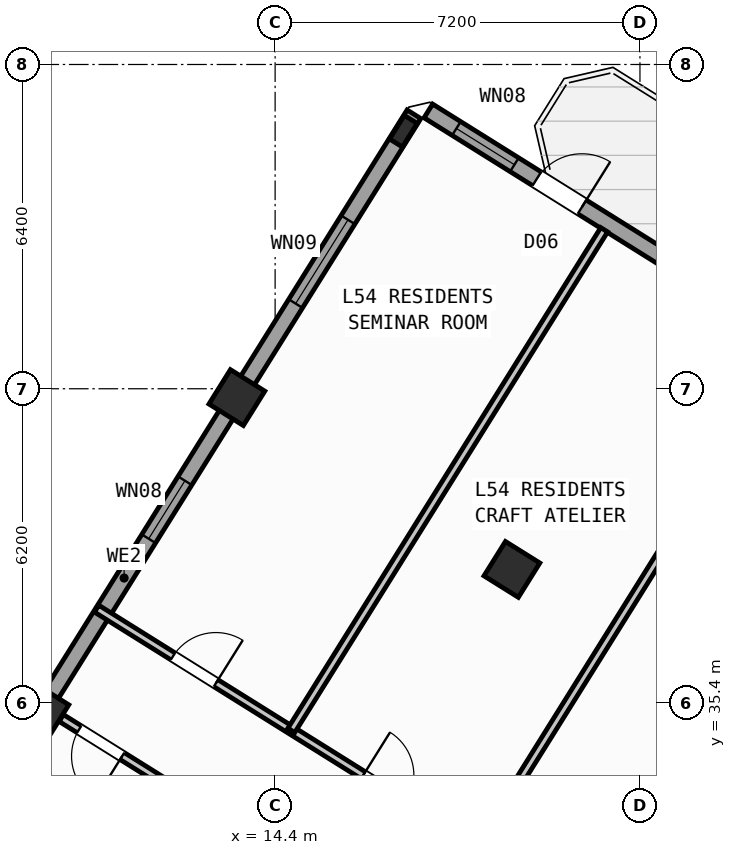
"""IFC4 building model, lengths in metres.
Left out: names, types, materials, properties, quantities, classifications, styles, units other than length and angle.
Written with IfcOpenShell. Run it as: python <this file> out.ifc"""

import sys

from ifc_helpers import new_model, si_unit, direction, frame, frame_2d, origin, origin_2d, place, context, subcontext, project, spatial, rectangle, hollow_rectangle, i_section, extrude, source, transform, mapped, element, fill, save


model = new_model("IFC4")
c1 = context("Model", 3, precision=1e-05, world=origin(), true_north=direction((0.0, 1.0)))
c2 = subcontext(c1, "Body", "Model", "MODEL_VIEW")
j1 = project(units=[si_unit("LENGTHUNIT", "METRE"), si_unit("PLANEANGLEUNIT", "RADIAN")], contexts=[c1])
p1 = place(None, origin())
s1 = spatial("IfcSite", under=j1, at=p1, CompositionType="ELEMENT")
p2 = place(p1, origin())
s2 = spatial("IfcBuilding", under=s1, at=p2, CompositionType="ELEMENT")
p3 = place(p2, frame((0.0, 0.0, 214.8)))
s3 = spatial("IfcBuildingStorey", under=s2, at=p3, CompositionType="ELEMENT", Elevation=214.8)
m1 = source(origin(), c2, "Body", "SweptSolid", [
    extrude(hollow_rectangle(XDim=0.8, YDim=0.8, WallThickness=0.032, at=origin_2d()), origin(), (0.0, 0.0, 1.0), 3.6),
])
p4 = place(p3, frame((19.073, 38.034, 0.0), z_axis=(0.0, 0.0, 1.0), x_axis=(-0.848048096156, 0.529919264233, 0.0)))
e1 = element("IfcColumn", 1, at=p4, inside=s3, PredefinedType="COLUMN", context=c2, shape_type="MappedRepresentation", body=[
    mapped(m1, transform((0.0, 0.0, 0.0), scale=1.0)),
])
m2 = source(origin(), c2, "Body", "SweptSolid", [
    extrude(i_section(OverallWidth=0.3, OverallDepth=0.55, WebThickness=0.015, FlangeThickness=0.029, at=origin_2d()), origin(), (0.0, 0.0, 1.0), 3.6),
])
p5 = place(p3, frame((16.931, 46.684, 0.0), z_axis=(0.0, 0.0, 1.0), x_axis=(-0.848048096156, 0.529919264233, 0.0)))
e2 = element("IfcColumn", 2, at=p5, inside=s3, PredefinedType="COLUMN", context=c2, shape_type="MappedRepresentation", body=[
    mapped(m2, transform((0.0, 0.0, 0.0), scale=1.0)),
])
for number, where, z_axis, x_axis in (
    (3, (13.646, 41.426, 0.0), (0.0, 0.0, 1.0), (-0.848, 0.53, 0.0)),
    (4, (9.777, 35.235, 0.0), (0.0, 0.0, 1.0), (-0.848, 0.53, 0.0)),
):
    element("IfcColumn", number, at=place(p3, frame(where, z_axis=z_axis, x_axis=x_axis)), inside=s3, PredefinedType="COLUMN", context=c2, shape_type="MappedRepresentation", body=[
        mapped(m1, transform((0.0, 0.0, 0.0), scale=1.0)),
    ])
p6 = place(p3, frame((5.7, 28.71, 0.0), z_axis=(0.0, 0.0, 1.0), x_axis=(0.529923711467, 0.8480453172, 0.0)))
e5 = element("IfcWall", 5, at=p6, inside=s3, PredefinedType="STANDARD", context=c2, shape_type="SweptSolid", body=[
    extrude(rectangle(XDim=21.587, YDim=0.32, at=frame_2d((10.794, 0.0))), origin(), (0.0, 0.0, 1.0), 2.825),
])
p7 = place(p6, frame((2.184, 0.0, 0.9)))
e6 = element("IfcOpeningElement", 6, at=p7, cuts=e5, PredefinedType="OPENING", context=c2, shape_type="SweptSolid", body=[
    extrude(rectangle(XDim=1.65, YDim=1.45, at=frame_2d((0.825, 0.725))), frame((0.0, 0.17, 0.0), z_axis=(0.0, -1.0, 0.0), x_axis=(1.0, 0.0, 0.0)), (0.0, 0.0, 1.0), 0.34),
])
p8 = place(p6, frame((11.709, 0.0, 0.9)))
e7 = element("IfcOpeningElement", 7, at=p8, cuts=e5, PredefinedType="OPENING", context=c2, shape_type="SweptSolid", body=[
    extrude(rectangle(XDim=1.35, YDim=1.45, at=frame_2d((0.675, 0.725))), frame((0.0, 0.17, 0.0), z_axis=(0.0, -1.0, 0.0), x_axis=(1.0, 0.0, 0.0)), (0.0, 0.0, 1.0), 0.34),
])
p9 = place(p6, frame((17.181, 0.0, 0.95)))
e8 = element("IfcOpeningElement", 8, at=p9, cuts=e5, PredefinedType="OPENING", context=c2, shape_type="SweptSolid", body=[
    extrude(rectangle(XDim=1.95, YDim=1.35, at=frame_2d((0.975, 0.675))), frame((0.0, 0.17, 0.0), z_axis=(0.0, -1.0, 0.0), x_axis=(1.0, 0.0, 0.0)), (0.0, 0.0, 1.0), 0.34),
])
p10 = place(p3, frame((17.424, 47.083, 0.0), z_axis=(0.0, 0.0, 1.0), x_axis=(0.848049927979, -0.529916332693, 0.0)))
e9 = element("IfcWall", 9, at=p10, inside=s3, PredefinedType="STANDARD", context=c2, shape_type="SweptSolid", body=[
    extrude(rectangle(XDim=29.223, YDim=0.32, at=frame_2d((14.612, 0.0))), origin(), (0.0, 0.0, 1.0), 3.35),
])
p11 = place(p10, frame((2.526, 0.0, 0.0)))
e10 = element("IfcOpeningElement", 10, at=p11, cuts=e9, PredefinedType="OPENING", context=c2, shape_type="SweptSolid", body=[
    extrude(rectangle(XDim=1.05, YDim=2.15, at=frame_2d((0.525, 1.075))), frame((0.0, 0.17, 0.0), z_axis=(0.0, -1.0, 0.0), x_axis=(1.0, 0.0, 0.0)), (0.0, 0.0, 1.0), 0.34),
])
p12 = place(p10, frame((0.653, 0.0, 0.9)))
e11 = element("IfcOpeningElement", 11, at=p12, cuts=e9, PredefinedType="OPENING", context=c2, shape_type="SweptSolid", body=[
    extrude(rectangle(XDim=1.35, YDim=1.45, at=frame_2d((0.675, 0.725))), frame((0.0, 0.17, 0.0), z_axis=(0.0, -1.0, 0.0), x_axis=(1.0, 0.0, 0.0)), (0.0, 0.0, 1.0), 0.34),
])
p13 = place(p10, frame((6.897, 0.0, 1.0)))
e12 = element("IfcOpeningElement", 12, at=p13, cuts=e9, PredefinedType="OPENING", context=c2, shape_type="SweptSolid", body=[
    extrude(rectangle(XDim=0.9, YDim=1.25, at=frame_2d((0.45, 0.625))), frame((0.0, 0.17, 0.0), z_axis=(0.0, -1.0, 0.0), x_axis=(1.0, 0.0, 0.0)), (0.0, 0.0, 1.0), 0.34),
])
p14 = place(p10, frame((9.602, 0.0, 0.95)))
e13 = element("IfcOpeningElement", 13, at=p14, cuts=e9, PredefinedType="OPENING", context=c2, shape_type="SweptSolid", body=[
    extrude(rectangle(XDim=1.95, YDim=1.35, at=frame_2d((0.975, 0.675))), frame((0.0, 0.17, 0.0), z_axis=(0.0, -1.0, 0.0), x_axis=(1.0, 0.0, 0.0)), (0.0, 0.0, 1.0), 0.34),
])
p15 = place(p10, frame((14.096, 0.0, 1.0)))
e14 = element("IfcOpeningElement", 14, at=p15, cuts=e9, PredefinedType="OPENING", context=c2, shape_type="SweptSolid", body=[
    extrude(rectangle(XDim=0.9, YDim=1.25, at=frame_2d((0.45, 0.625))), frame((0.0, 0.17, 0.0), z_axis=(0.0, -1.0, 0.0), x_axis=(1.0, 0.0, 0.0)), (0.0, 0.0, 1.0), 0.34),
])
p16 = place(p10, frame((17.254, 0.0, 1.0)))
e15 = element("IfcOpeningElement", 15, at=p16, cuts=e9, PredefinedType="OPENING", context=c2, shape_type="SweptSolid", body=[
    extrude(rectangle(XDim=0.9, YDim=1.25, at=frame_2d((0.45, 0.625))), frame((0.0, 0.17, 0.0), z_axis=(0.0, -1.0, 0.0), x_axis=(1.0, 0.0, 0.0)), (0.0, 0.0, 1.0), 0.34),
])
p17 = place(p10, frame((21.139, 0.0, 0.9)))
e16 = element("IfcOpeningElement", 16, at=p17, cuts=e9, PredefinedType="OPENING", context=c2, shape_type="SweptSolid", body=[
    extrude(rectangle(XDim=1.35, YDim=1.45, at=frame_2d((0.675, 0.725))), frame((0.0, 0.17, 0.0), z_axis=(0.0, -1.0, 0.0), x_axis=(1.0, 0.0, 0.0)), (0.0, 0.0, 1.0), 0.34),
])
p18 = place(p10, frame((25.778, 0.0, 0.9)))
e17 = element("IfcOpeningElement", 17, at=p18, cuts=e9, PredefinedType="OPENING", context=c2, shape_type="SweptSolid", body=[
    extrude(rectangle(XDim=1.35, YDim=1.45, at=frame_2d((0.675, 0.725))), frame((0.0, 0.17, 0.0), z_axis=(0.0, -1.0, 0.0), x_axis=(1.0, 0.0, 0.0)), (0.0, 0.0, 1.0), 0.34),
])
p19 = place(p3, frame((25.065, 28.394, 0.0), z_axis=(0.0, 0.0, 1.0), x_axis=(-0.848048310262, 0.529918921593, 0.0)))
e18 = element("IfcWall", 18, at=p19, inside=s3, PredefinedType="PARTITIONING", context=c2, shape_type="SweptSolid", body=[
    extrude(rectangle(XDim=16.73, YDim=0.16, at=frame_2d((8.365, 0.0))), origin(), (0.0, 0.0, 1.0), 3.34),
])
p20 = place(p19, frame((1.338, 0.0, 0.0)))
e19 = element("IfcOpeningElement", 19, at=p20, cuts=e18, PredefinedType="OPENING", context=c2, shape_type="SweptSolid", body=[
    extrude(rectangle(XDim=1.0, YDim=2.1, at=frame_2d((0.5, 1.05))), frame((0.0, 0.09, 0.0), z_axis=(0.0, -1.0, 0.0), x_axis=(1.0, 0.0, 0.0)), (0.0, 0.0, 1.0), 0.18),
])
p21 = place(p19, frame((5.265, 0.0, 0.0)))
e20 = element("IfcOpeningElement", 20, at=p21, cuts=e18, PredefinedType="OPENING", context=c2, shape_type="SweptSolid", body=[
    extrude(rectangle(XDim=1.0, YDim=2.1, at=frame_2d((0.5, 1.05))), frame((0.0, 0.09, 0.0), z_axis=(0.0, -1.0, 0.0), x_axis=(1.0, 0.0, 0.0)), (0.0, 0.0, 1.0), 0.18),
])
p22 = place(p19, frame((9.526, 0.0, 0.0)))
e21 = element("IfcOpeningElement", 21, at=p22, cuts=e18, PredefinedType="OPENING", context=c2, shape_type="SweptSolid", body=[
    extrude(rectangle(XDim=1.0, YDim=2.1, at=frame_2d((0.5, 1.05))), frame((0.0, 0.09, 0.0), z_axis=(0.0, -1.0, 0.0), x_axis=(1.0, 0.0, 0.0)), (0.0, 0.0, 1.0), 0.18),
])
p23 = place(p19, frame((13.954, 0.0, 0.0)))
e22 = element("IfcOpeningElement", 22, at=p23, cuts=e18, PredefinedType="OPENING", context=c2, shape_type="SweptSolid", body=[
    extrude(rectangle(XDim=1.0, YDim=2.1, at=frame_2d((0.5, 1.05))), frame((0.0, 0.09, 0.0), z_axis=(0.0, -1.0, 0.0), x_axis=(1.0, 0.0, 0.0)), (0.0, 0.0, 1.0), 0.18),
])
p24 = place(p3, frame((14.908, 32.147, 0.0), z_axis=(0.0, 0.0, 1.0), x_axis=(-0.848049955116, 0.529916289265, 0.0)))
e23 = element("IfcWall", 23, at=p24, inside=s3, PredefinedType="PARTITIONING", context=c2, shape_type="SweptSolid", body=[
    extrude(rectangle(XDim=5.576, YDim=0.16, at=frame_2d((2.788, 0.0))), origin(), (0.0, 0.0, 1.0), 2.825),
])
p25 = place(p24, frame((4.158, 0.0, 0.0)))
e24 = element("IfcOpeningElement", 24, at=p25, cuts=e23, PredefinedType="OPENING", context=c2, shape_type="SweptSolid", body=[
    extrude(rectangle(XDim=1.0, YDim=2.1, at=frame_2d((0.5, 1.05))), frame((0.0, 0.09, 0.0), z_axis=(0.0, -1.0, 0.0), x_axis=(1.0, 0.0, 0.0)), (0.0, 0.0, 1.0), 0.18),
])
p26 = place(p3, frame((24.379, 34.233, 0.0), z_axis=(0.0, 0.0, 1.0), x_axis=(-0.529922402838, -0.84804613493, 0.0)))
e25 = element("IfcWall", 25, at=p26, inside=s3, PredefinedType="PARTITIONING", context=c2, shape_type="SweptSolid", body=[
    extrude(rectangle(XDim=4.588, YDim=0.16, at=frame_2d((2.294, 0.0))), origin(), (0.0, 0.0, 1.0), 2.825),
])
for number, where, z_axis, x_axis in (
    (26, (24.578, 42.436, 0.0), (0.0, 0.0, 1.0), (-0.53, -0.848, 0.0)),
    (27, (20.894, 44.738, 0.0), (0.0, 0.0, 1.0), (-0.53, -0.848, 0.0)),
):
    element("IfcWall", number, at=place(p3, frame(where, z_axis=z_axis, x_axis=x_axis)), inside=s3, PredefinedType="PARTITIONING", context=c2, shape_type="SweptSolid", body=[
        extrude(rectangle(XDim=11.65, YDim=0.16, at=frame_2d((5.825, 0.0))), origin(), (0.0, 0.0, 1.0), 2.995),
    ])
m3 = source(origin(), c2, "Body", "SweptSolid", [
    extrude(rectangle(XDim=1.05, YDim=2.15, at=frame_2d((0.525, 1.075))), frame((0.0, 0.025, 0.0), z_axis=(0.0, -1.0, 0.0), x_axis=(1.0, 0.0, 0.0)), (0.0, 0.0, 1.0), 0.05),
])
p27 = place(p11, origin())
e28 = element("IfcDoor", 28, at=p27, inside=s3, OperationType="SINGLE_SWING_RIGHT", PredefinedType="DOOR", context=c2, shape_type="MappedRepresentation", body=[
    mapped(m3, transform((0.0, 0.0, 0.0), scale=1.0)),
])
fill(e10, e28)
m4 = source(origin(), c2, "Body", "SweptSolid", [
    extrude(rectangle(XDim=1.35, YDim=1.45, at=frame_2d((0.675, 0.725))), frame((0.0, 0.03, 0.0), z_axis=(0.0, -1.0, 0.0), x_axis=(1.0, 0.0, 0.0)), (0.0, 0.0, 1.0), 0.06),
])
p28 = place(p8, origin())
e29 = element("IfcWindow", 29, at=p28, inside=s3, PartitioningType="SINGLE_PANEL", PredefinedType="WINDOW", context=c2, shape_type="MappedRepresentation", body=[
    mapped(m4, transform((0.0, 0.0, 0.0), scale=1.0)),
])
fill(e7, e29)
m5 = source(origin(), c2, "Body", "SweptSolid", [
    extrude(rectangle(XDim=1.95, YDim=1.35, at=frame_2d((0.975, 0.675))), frame((0.0, 0.03, 0.0), z_axis=(0.0, -1.0, 0.0), x_axis=(1.0, 0.0, 0.0)), (0.0, 0.0, 1.0), 0.06),
])
p29 = place(p9, origin())
e30 = element("IfcWindow", 30, at=p29, inside=s3, PartitioningType="SINGLE_PANEL", PredefinedType="WINDOW", context=c2, shape_type="MappedRepresentation", body=[
    mapped(m5, transform((0.0, 0.0, 0.0), scale=1.0)),
])
fill(e8, e30)
p30 = place(p12, origin())
e31 = element("IfcWindow", 31, at=p30, inside=s3, PartitioningType="SINGLE_PANEL", PredefinedType="WINDOW", context=c2, shape_type="MappedRepresentation", body=[
    mapped(m4, transform((0.0, 0.0, 0.0), scale=1.0)),
])
fill(e11, e31)
m6 = source(origin(), c2, "Body", "SweptSolid", [
    extrude(rectangle(XDim=1.0, YDim=2.1, at=frame_2d((0.5, 1.05))), frame((0.0, 0.025, 0.0), z_axis=(0.0, -1.0, 0.0), x_axis=(1.0, 0.0, 0.0)), (0.0, 0.0, 1.0), 0.05),
])
p31 = place(p25, origin())
e32 = element("IfcDoor", 32, at=p31, inside=s3, OperationType="SINGLE_SWING_LEFT", PredefinedType="DOOR", context=c2, shape_type="MappedRepresentation", body=[
    mapped(m6, transform((0.0, 0.0, 0.0), scale=1.0)),
])
fill(e24, e32)
p32 = place(p22, frame((1.0, 0.0, 0.0), z_axis=(0.0, 0.0, 1.0), x_axis=(-1.0, 0.0, 0.0)))
e33 = element("IfcDoor", 33, at=p32, inside=s3, OperationType="SINGLE_SWING_LEFT", PredefinedType="DOOR", context=c2, shape_type="MappedRepresentation", body=[
    mapped(m6, transform((0.0, 0.0, 0.0), scale=1.0)),
])
fill(e21, e33)
p33 = place(p23, frame((1.0, 0.0, 0.0), z_axis=(0.0, 0.0, 1.0), x_axis=(-1.0, 0.0, 0.0)))
e34 = element("IfcDoor", 34, at=p33, inside=s3, OperationType="SINGLE_SWING_RIGHT", PredefinedType="DOOR", context=c2, shape_type="MappedRepresentation", body=[
    mapped(m6, transform((0.0, 0.0, 0.0), scale=1.0)),
])
fill(e22, e34)
save(model, sys.argv[1])
